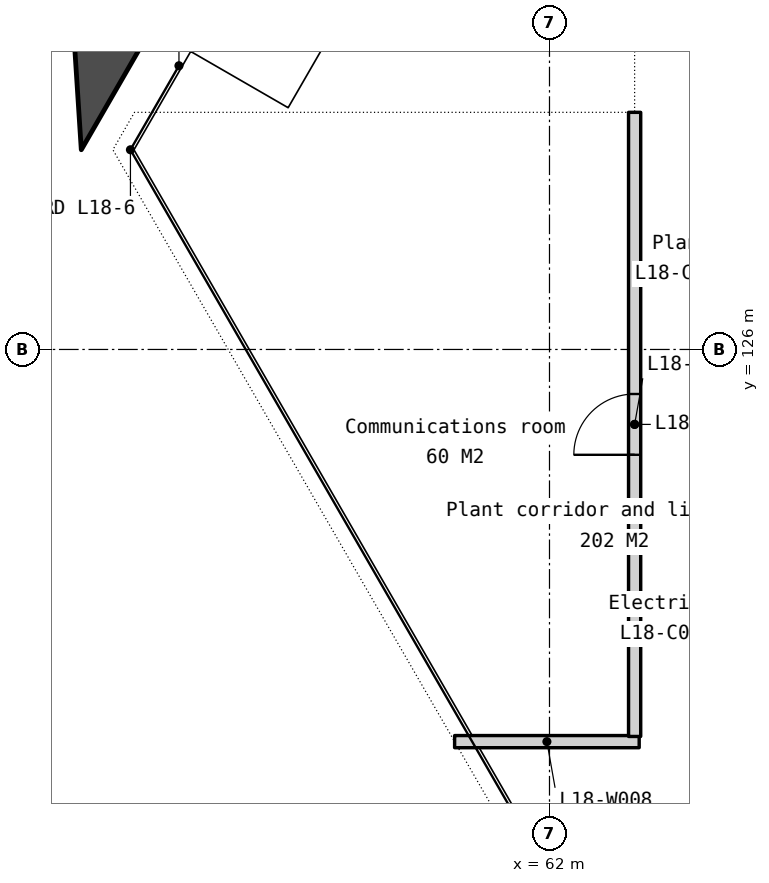
"""IFC4 building model, lengths in metres.
Left out: names, types, materials, properties, quantities, classifications, styles, units other than length and angle.
Written with IfcOpenShell. Run it as: python <this file> out.ifc"""

import sys

from ifc_helpers import new_model, si_unit, direction, frame, frame_2d, origin, place, context, subcontext, project, spatial, polyline, rectangle, outline, extrude, element, fill, save


model = new_model("IFC4")
c1 = context("Model", 3, precision=1e-05, world=origin(), true_north=direction((0.0, 1.0)))
c2 = subcontext(c1, "Body", "Model", "MODEL_VIEW")
j1 = project(units=[si_unit("LENGTHUNIT", "METRE"), si_unit("PLANEANGLEUNIT", "RADIAN")], contexts=[c1])
p1 = place(None, origin())
s1 = spatial("IfcSite", under=j1, at=p1, CompositionType="ELEMENT")
p2 = place(p1, origin())
s2 = spatial("IfcBuilding", under=s1, at=p2, CompositionType="ELEMENT")
p3 = place(p2, frame((0.0, 0.0, 77.0)))
s3 = spatial("IfcBuildingStorey", under=s2, at=p3, CompositionType="ELEMENT", Elevation=77.0)
p4 = place(p3, frame((0.0, 0.0, -0.25)))
e1 = element("IfcWall", 1, at=p4, inside=s3, PredefinedType="SOLIDWALL", context=c2, shape_type="SweptSolid", body=[
    extrude(outline(polyline([(57.6, 135.0), (53.989, 134.125), (54.3, 129.284), (57.6, 135.0)])), origin(), (0.0, 0.0, 1.0), 4.6),
])
p5 = place(p3, frame((60.44, 119.55, 0.0), z_axis=(0.0, 0.0, 1.0), x_axis=(1.0, 0.0, 0.0)))
e2 = element("IfcWall", 2, at=p5, inside=s3, PredefinedType="PARTITIONING", context=c2, shape_type="SweptSolid", body=[
    extrude(rectangle(XDim=3.035, YDim=0.2, at=frame_2d((1.518, 0.0))), origin(), (0.0, 0.0, 1.0), 4.35),
])
p6 = place(p3, frame((63.4, 119.635, 0.0), z_axis=(0.0, 0.0, 1.0), x_axis=(0.0, 1.0, 0.0)))
e3 = element("IfcWall", 3, at=p6, inside=s3, PredefinedType="PARTITIONING", context=c2, shape_type="SweptSolid", body=[
    extrude(rectangle(XDim=10.265, YDim=0.2, at=frame_2d((5.132, 0.0))), origin(), (0.0, 0.0, 1.0), 4.35),
])
p7 = place(p6, frame((4.633, 0.0, 0.0)))
e4 = element("IfcOpeningElement", 4, at=p7, cuts=e3, PredefinedType="OPENING", context=c2, shape_type="SweptSolid", body=[
    extrude(rectangle(XDim=1.0, YDim=2.1, at=frame_2d((0.5, 1.05))), frame((0.0, 0.11, 0.0), z_axis=(0.0, -1.0, 0.0), x_axis=(1.0, 0.0, 0.0)), (0.0, 0.0, 1.0), 0.22),
])
p8 = place(p7, origin())
e5 = element("IfcDoor", 5, at=p8, inside=s3, OperationType="SINGLE_SWING_LEFT", PredefinedType="DOOR", context=c2, shape_type="SweptSolid", body=[
    extrude(rectangle(XDim=1.0, YDim=2.1, at=frame_2d((0.5, 1.05))), frame((0.0, 0.025, 0.0), z_axis=(0.0, -1.0, 0.0), x_axis=(1.0, 0.0, 0.0)), (0.0, 0.0, 1.0), 0.05),
])
fill(e4, e5)
save(model, sys.argv[1])
